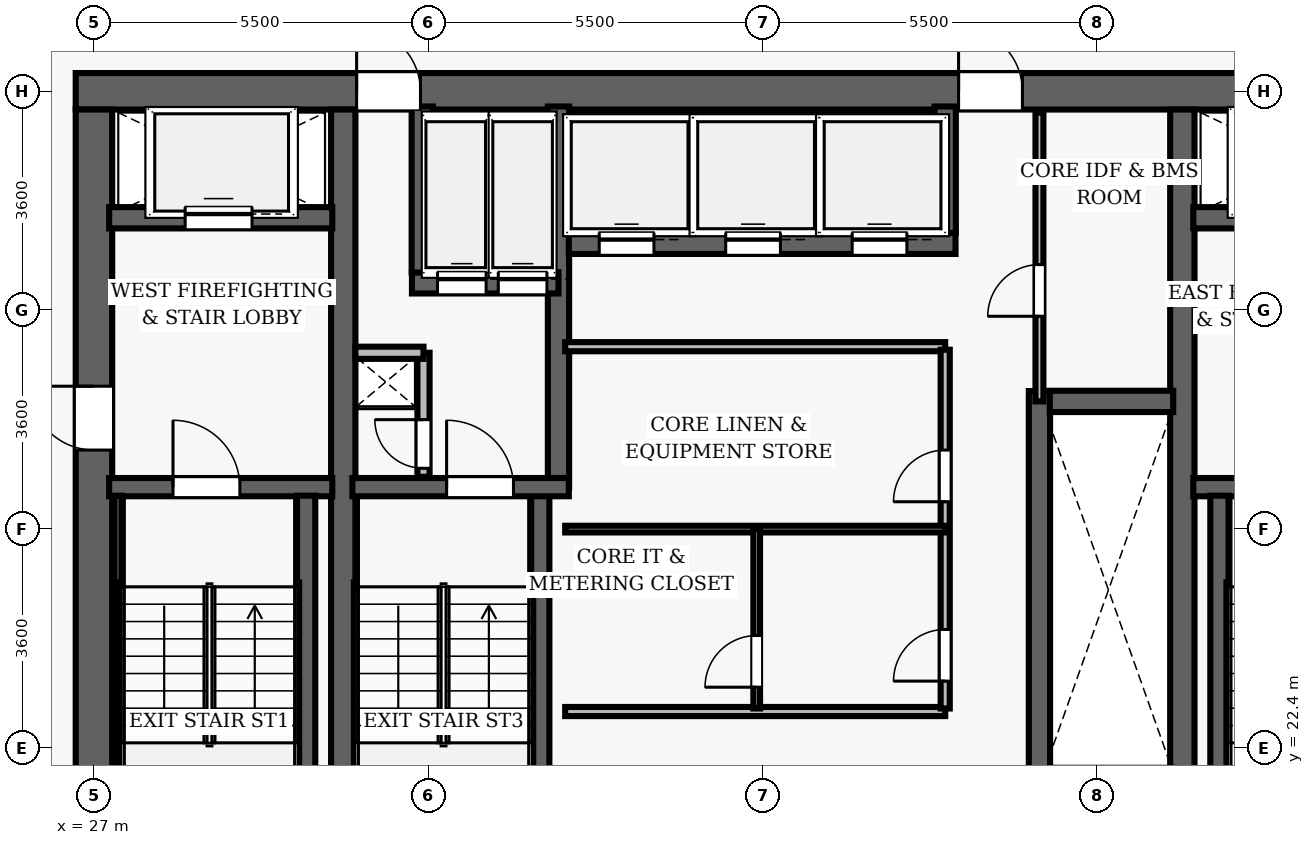
"""IFC4 building model, lengths in metres.
Left out: names, types, materials, properties, quantities, classifications, styles, units other than length and angle.
Written with IfcOpenShell. Run it as: python <this file> out.ifc"""

import sys

from ifc_helpers import new_model, si_unit, direction, frame, frame_2d, origin, place, context, subcontext, project, spatial, rectangle, extrude, element, fill, save


model = new_model("IFC4")
c1 = context("Model", 3, precision=1e-05, world=origin(), true_north=direction((0.0, 1.0)))
c2 = subcontext(c1, "Body", "Model", "MODEL_VIEW")
j1 = project(units=[si_unit("LENGTHUNIT", "METRE"), si_unit("PLANEANGLEUNIT", "RADIAN")], contexts=[c1])
p1 = place(None, origin())
s1 = spatial("IfcSite", under=j1, at=p1, CompositionType="ELEMENT")
p2 = place(p1, origin())
s2 = spatial("IfcBuilding", under=s1, at=p2, CompositionType="ELEMENT")
p3 = place(p2, frame((0.0, 0.0, 62.4)))
s3 = spatial("IfcBuildingStorey", under=s2, at=p3, CompositionType="ELEMENT", Elevation=62.4)
p4 = place(p3, frame((26.7, 33.2, 0.0), z_axis=(0.0, 0.0, 1.0), x_axis=(1.0, 0.0, 0.0)))
e1 = element("IfcWall", 1, at=p4, inside=s3, PredefinedType="SHEAR", context=c2, shape_type="SweptSolid", body=[
    extrude(rectangle(XDim=22.6, YDim=0.6, at=frame_2d((11.3, 0.0))), origin(), (0.0, 0.0, 1.0), 3.5),
])
p5 = place(p4, frame((4.62, 0.0, 0.0)))
e2 = element("IfcOpeningElement", 2, at=p5, cuts=e1, PredefinedType="OPENING", context=c2, shape_type="SweptSolid", body=[
    extrude(rectangle(XDim=1.05, YDim=2.15, at=frame_2d((0.525, 1.075))), frame((0.0, 0.31, 0.0), z_axis=(0.0, -1.0, 0.0), x_axis=(1.0, 0.0, 0.0)), (0.0, 0.0, 1.0), 0.62),
])
p6 = place(p4, frame((14.52, 0.0, 0.0)))
e3 = element("IfcOpeningElement", 3, at=p6, cuts=e1, PredefinedType="OPENING", context=c2, shape_type="SweptSolid", body=[
    extrude(rectangle(XDim=1.05, YDim=2.15, at=frame_2d((0.525, 1.075))), frame((0.0, 0.31, 0.0), z_axis=(0.0, -1.0, 0.0), x_axis=(1.0, 0.0, 0.0)), (0.0, 0.0, 1.0), 0.62),
])
p7 = place(p3, frame((27.0, 19.1, 0.0), z_axis=(0.0, 0.0, 1.0), x_axis=(0.0, 1.0, 0.0)))
e4 = element("IfcWall", 4, at=p7, inside=s3, PredefinedType="SHEAR", context=c2, shape_type="SweptSolid", body=[
    extrude(rectangle(XDim=13.8, YDim=0.6, at=frame_2d((6.9, 0.0))), origin(), (0.0, 0.0, 1.0), 3.5),
])
p8 = place(p7, frame((8.2, 0.0, 0.0)))
e5 = element("IfcOpeningElement", 5, at=p8, cuts=e4, PredefinedType="OPENING", context=c2, shape_type="SweptSolid", body=[
    extrude(rectangle(XDim=1.05, YDim=2.15, at=frame_2d((0.525, 1.075))), frame((0.0, 0.31, 0.0), z_axis=(0.0, -1.0, 0.0), x_axis=(1.0, 0.0, 0.0)), (0.0, 0.0, 1.0), 0.62),
])
for number, where, z_axis, x_axis in (
    (6, (31.1, 19.1, 0.0), (0.0, 0.0, 1.0), (0.0, 1.0, 0.0)),
    (7, (44.9, 19.1, 0.0), (0.0, 0.0, 1.0), (0.0, 1.0, 0.0)),
):
    element("IfcWall", number, at=place(p3, frame(where, z_axis=z_axis, x_axis=x_axis)), inside=s3, PredefinedType="SHEAR", context=c2, shape_type="SweptSolid", body=[
        extrude(rectangle(XDim=13.8, YDim=0.4, at=frame_2d((6.9, 0.0))), origin(), (0.0, 0.0, 1.0), 3.5),
    ])
p9 = place(p3, frame((27.25, 26.69, 0.0), z_axis=(0.0, 0.0, 1.0), x_axis=(1.0, 0.0, 0.0)))
e8 = element("IfcWall", 8, at=p9, inside=s3, PredefinedType="SHEAR", context=c2, shape_type="SweptSolid", body=[
    extrude(rectangle(XDim=3.67, YDim=0.3, at=frame_2d((1.835, 0.0))), origin(), (0.0, 0.0, 1.0), 3.5),
])
p10 = place(p9, frame((1.05, 0.0, 0.0)))
e9 = element("IfcOpeningElement", 9, at=p10, cuts=e8, PredefinedType="OPENING", context=c2, shape_type="SweptSolid", body=[
    extrude(rectangle(XDim=1.1, YDim=2.15, at=frame_2d((0.55, 1.075))), frame((0.0, 0.16, 0.0), z_axis=(0.0, -1.0, 0.0), x_axis=(1.0, 0.0, 0.0)), (0.0, 0.0, 1.0), 0.32),
])
p11 = place(p3, frame((30.49, 19.05, 0.0), z_axis=(0.0, 0.0, 1.0), x_axis=(0.0, 1.0, 0.0)))
e10 = element("IfcWall", 10, at=p11, inside=s3, PredefinedType="SHEAR", context=c2, shape_type="SweptSolid", body=[
    extrude(rectangle(XDim=7.5, YDim=0.3, at=frame_2d((3.75, 0.0))), origin(), (0.0, 0.0, 1.0), 3.5),
])
p12 = place(p3, frame((27.395, 19.1, 0.0), z_axis=(0.0, 0.0, 1.0), x_axis=(0.0, 1.0, 0.0)))
e11 = element("IfcWall", 11, at=p12, inside=s3, PredefinedType="SHEAR", context=c2, shape_type="SweptSolid", body=[
    extrude(rectangle(XDim=7.45, YDim=0.12, at=frame_2d((3.725, 0.0))), origin(), (0.0, 0.0, 1.0), 3.5),
])
p13 = place(p3, frame((27.25, 31.12, 0.0), z_axis=(0.0, 0.0, 1.0), x_axis=(1.0, 0.0, 0.0)))
e12 = element("IfcWall", 12, at=p13, inside=s3, PredefinedType="SHEAR", context=c2, shape_type="SweptSolid", body=[
    extrude(rectangle(XDim=3.67, YDim=0.35, at=frame_2d((1.835, 0.0))), origin(), (0.0, 0.0, 1.0), 2.6),
])
p14 = place(p13, frame((1.25, 0.0, 0.0)))
e13 = element("IfcOpeningElement", 13, at=p14, cuts=e12, PredefinedType="OPENING", context=c2, shape_type="SweptSolid", body=[
    extrude(rectangle(XDim=1.1, YDim=2.15, at=frame_2d((0.55, 1.075))), frame((0.0, 0.185, 0.0), z_axis=(0.0, -1.0, 0.0), x_axis=(1.0, 0.0, 0.0)), (0.0, 0.0, 1.0), 0.37),
])
p15 = place(p3, frame((45.08, 26.69, 0.0), z_axis=(0.0, 0.0, 1.0), x_axis=(1.0, 0.0, 0.0)))
e14 = element("IfcWall", 14, at=p15, inside=s3, PredefinedType="SHEAR", context=c2, shape_type="SweptSolid", body=[
    extrude(rectangle(XDim=3.67, YDim=0.3, at=frame_2d((1.835, 0.0))), origin(), (0.0, 0.0, 1.0), 3.5),
])
p16 = place(p15, frame((1.05, 0.0, 0.0)))
e15 = element("IfcOpeningElement", 15, at=p16, cuts=e14, PredefinedType="OPENING", context=c2, shape_type="SweptSolid", body=[
    extrude(rectangle(XDim=1.1, YDim=2.15, at=frame_2d((0.55, 1.075))), frame((0.0, 0.16, 0.0), z_axis=(0.0, -1.0, 0.0), x_axis=(1.0, 0.0, 0.0)), (0.0, 0.0, 1.0), 0.32),
])
p17 = place(p3, frame((45.51, 19.05, 0.0), z_axis=(0.0, 0.0, 1.0), x_axis=(0.0, 1.0, 0.0)))
e16 = element("IfcWall", 16, at=p17, inside=s3, PredefinedType="SHEAR", context=c2, shape_type="SweptSolid", body=[
    extrude(rectangle(XDim=7.5, YDim=0.3, at=frame_2d((3.75, 0.0))), origin(), (0.0, 0.0, 1.0), 3.5),
])
p18 = place(p3, frame((45.08, 31.12, 0.0), z_axis=(0.0, 0.0, 1.0), x_axis=(1.0, 0.0, 0.0)))
e17 = element("IfcWall", 17, at=p18, inside=s3, PredefinedType="SHEAR", context=c2, shape_type="SweptSolid", body=[
    extrude(rectangle(XDim=3.67, YDim=0.35, at=frame_2d((1.835, 0.0))), origin(), (0.0, 0.0, 1.0), 2.6),
])
p19 = place(p18, frame((1.25, 0.0, 0.0)))
e18 = element("IfcOpeningElement", 18, at=p19, cuts=e17, PredefinedType="OPENING", context=c2, shape_type="SweptSolid", body=[
    extrude(rectangle(XDim=1.1, YDim=2.15, at=frame_2d((0.55, 1.075))), frame((0.0, 0.185, 0.0), z_axis=(0.0, -1.0, 0.0), x_axis=(1.0, 0.0, 0.0)), (0.0, 0.0, 1.0), 0.37),
])
p20 = place(p3, frame((34.34, 19.05, 0.0), z_axis=(0.0, 0.0, 1.0), x_axis=(0.0, 1.0, 0.0)))
e19 = element("IfcWall", 19, at=p20, inside=s3, PredefinedType="SHEAR", context=c2, shape_type="SweptSolid", body=[
    extrude(rectangle(XDim=7.5, YDim=0.3, at=frame_2d((3.75, 0.0))), origin(), (0.0, 0.0, 1.0), 3.5),
])
p21 = place(p3, frame((34.64, 26.69, 0.0), z_axis=(0.0, 0.0, 1.0), x_axis=(0.0, 1.0, 0.0)))
e20 = element("IfcWall", 20, at=p21, inside=s3, PredefinedType="SHEAR", context=c2, shape_type="SweptSolid", body=[
    extrude(rectangle(XDim=6.26, YDim=0.35, at=frame_2d((3.13, 0.0))), origin(), (0.0, 0.0, 1.0), 3.5),
])
p22 = place(p3, frame((31.25, 26.69, 0.0), z_axis=(0.0, 0.0, 1.0), x_axis=(1.0, 0.0, 0.0)))
e21 = element("IfcWall", 21, at=p22, inside=s3, PredefinedType="SHEAR", context=c2, shape_type="SweptSolid", body=[
    extrude(rectangle(XDim=3.56, YDim=0.3, at=frame_2d((1.78, 0.0))), origin(), (0.0, 0.0, 1.0), 3.5),
])
p23 = place(p22, frame((1.55, 0.0, 0.0)))
e22 = element("IfcOpeningElement", 22, at=p23, cuts=e21, PredefinedType="OPENING", context=c2, shape_type="SweptSolid", body=[
    extrude(rectangle(XDim=1.1, YDim=2.15, at=frame_2d((0.55, 1.075))), frame((0.0, 0.16, 0.0), z_axis=(0.0, -1.0, 0.0), x_axis=(1.0, 0.0, 0.0)), (0.0, 0.0, 1.0), 0.32),
])
p24 = place(p3, frame((32.23, 30.05, 0.0), z_axis=(0.0, 0.0, 1.0), x_axis=(1.0, 0.0, 0.0)))
e23 = element("IfcWall", 23, at=p24, inside=s3, PredefinedType="SHEAR", context=c2, shape_type="SweptSolid", body=[
    extrude(rectangle(XDim=2.41, YDim=0.35, at=frame_2d((1.205, 0.0))), origin(), (0.0, 0.0, 1.0), 2.6),
])
p25 = place(p24, frame((0.42, 0.0, 0.0)))
e24 = element("IfcOpeningElement", 24, at=p25, cuts=e23, PredefinedType="OPENING", context=c2, shape_type="SweptSolid", body=[
    extrude(rectangle(XDim=0.8, YDim=2.15, at=frame_2d((0.4, 1.075))), frame((0.0, 0.185, 0.0), z_axis=(0.0, -1.0, 0.0), x_axis=(1.0, 0.0, 0.0)), (0.0, 0.0, 1.0), 0.37),
])
p26 = place(p24, frame((1.42, 0.0, 0.0)))
e25 = element("IfcOpeningElement", 25, at=p26, cuts=e23, PredefinedType="OPENING", context=c2, shape_type="SweptSolid", body=[
    extrude(rectangle(XDim=0.8, YDim=2.15, at=frame_2d((0.4, 1.075))), frame((0.0, 0.185, 0.0), z_axis=(0.0, -1.0, 0.0), x_axis=(1.0, 0.0, 0.0)), (0.0, 0.0, 1.0), 0.37),
])
p27 = place(p3, frame((32.4, 30.22, 0.0), z_axis=(0.0, 0.0, 1.0), x_axis=(0.0, 1.0, 0.0)))
e26 = element("IfcWall", 26, at=p27, inside=s3, PredefinedType="SHEAR", context=c2, shape_type="SweptSolid", body=[
    extrude(rectangle(XDim=2.73, YDim=0.35, at=frame_2d((1.365, 0.0))), origin(), (0.0, 0.0, 1.0), 2.6),
])
p28 = place(p3, frame((32.42, 26.86, 0.0), z_axis=(0.0, 0.0, 1.0), x_axis=(0.0, 1.0, 0.0)))
e27 = element("IfcWall", 27, at=p28, inside=s3, PredefinedType="PARTITIONING", context=c2, shape_type="SweptSolid", body=[
    extrude(rectangle(XDim=2.04, YDim=0.2, at=frame_2d((1.02, 0.0))), origin(), (0.0, 0.0, 1.0), 2.6),
])
p29 = place(p28, frame((0.14, 0.0, 0.0)))
e28 = element("IfcOpeningElement", 28, at=p29, cuts=e27, PredefinedType="OPENING", context=c2, shape_type="SweptSolid", body=[
    extrude(rectangle(XDim=0.8, YDim=2.05, at=frame_2d((0.4, 1.025))), frame((0.0, 0.11, 0.0), z_axis=(0.0, -1.0, 0.0), x_axis=(1.0, 0.0, 0.0)), (0.0, 0.0, 1.0), 0.22),
])
p30 = place(p3, frame((31.3, 28.9, 0.0), z_axis=(0.0, 0.0, 1.0), x_axis=(1.0, 0.0, 0.0)))
e29 = element("IfcWall", 29, at=p30, inside=s3, PredefinedType="PARTITIONING", context=c2, shape_type="SweptSolid", body=[
    extrude(rectangle(XDim=1.12, YDim=0.2, at=frame_2d((0.56, 0.0))), origin(), (0.0, 0.0, 1.0), 2.6),
])
p31 = place(p3, frame((42.55, 21.73, 0.0), z_axis=(0.0, 0.0, 1.0), x_axis=(0.0, 1.0, 0.0)))
e30 = element("IfcWall", 30, at=p31, inside=s3, PredefinedType="SHEAR", context=c2, shape_type="SweptSolid", body=[
    extrude(rectangle(XDim=6.54, YDim=0.35, at=frame_2d((3.27, 0.0))), origin(), (0.0, 0.0, 1.0), 2.6),
])
p32 = place(p3, frame((42.72, 28.1, 0.0), z_axis=(0.0, 0.0, 1.0), x_axis=(1.0, 0.0, 0.0)))
e31 = element("IfcWall", 31, at=p32, inside=s3, PredefinedType="SHEAR", context=c2, shape_type="SweptSolid", body=[
    extrude(rectangle(XDim=2.03, YDim=0.35, at=frame_2d((1.015, 0.0))), origin(), (0.0, 0.0, 1.0), 2.6),
])
p33 = place(p3, frame((34.81, 30.7, 0.0), z_axis=(0.0, 0.0, 1.0), x_axis=(1.0, 0.0, 0.0)))
e32 = element("IfcWall", 32, at=p33, inside=s3, PredefinedType="SHEAR", context=c2, shape_type="SweptSolid", body=[
    extrude(rectangle(XDim=6.36, YDim=0.35, at=frame_2d((3.18, 0.0))), origin(), (0.0, 0.0, 1.0), 2.6),
])
p34 = place(p33, frame((0.5, 0.0, 0.0)))
e33 = element("IfcOpeningElement", 33, at=p34, cuts=e32, PredefinedType="OPENING", context=c2, shape_type="SweptSolid", body=[
    extrude(rectangle(XDim=0.9, YDim=2.15, at=frame_2d((0.45, 1.075))), frame((0.0, 0.185, 0.0), z_axis=(0.0, -1.0, 0.0), x_axis=(1.0, 0.0, 0.0)), (0.0, 0.0, 1.0), 0.37),
])
p35 = place(p33, frame((2.58, 0.0, 0.0)))
e34 = element("IfcOpeningElement", 34, at=p35, cuts=e32, PredefinedType="OPENING", context=c2, shape_type="SweptSolid", body=[
    extrude(rectangle(XDim=0.9, YDim=2.15, at=frame_2d((0.45, 1.075))), frame((0.0, 0.185, 0.0), z_axis=(0.0, -1.0, 0.0), x_axis=(1.0, 0.0, 0.0)), (0.0, 0.0, 1.0), 0.37),
])
p36 = place(p33, frame((4.66, 0.0, 0.0)))
e35 = element("IfcOpeningElement", 35, at=p36, cuts=e32, PredefinedType="OPENING", context=c2, shape_type="SweptSolid", body=[
    extrude(rectangle(XDim=0.9, YDim=2.15, at=frame_2d((0.45, 1.075))), frame((0.0, 0.185, 0.0), z_axis=(0.0, -1.0, 0.0), x_axis=(1.0, 0.0, 0.0)), (0.0, 0.0, 1.0), 0.37),
])
p37 = place(p3, frame((41.0, 30.87, 0.0), z_axis=(0.0, 0.0, 1.0), x_axis=(0.0, 1.0, 0.0)))
e36 = element("IfcWall", 36, at=p37, inside=s3, PredefinedType="SHEAR", context=c2, shape_type="SweptSolid", body=[
    extrude(rectangle(XDim=2.08, YDim=0.35, at=frame_2d((1.04, 0.0))), origin(), (0.0, 0.0, 1.0), 2.6),
])
for number, where, z_axis, x_axis in (
    (37, (34.75, 29.0, 0.0), (0.0, 0.0, 1.0), (1.0, 0.0, 0.0)),
    (38, (34.75, 23.0, 0.0), (0.0, 0.0, 1.0), (1.0, 0.0, 0.0)),
):
    element("IfcWall", number, at=place(p3, frame(where, z_axis=z_axis, x_axis=x_axis)), inside=s3, PredefinedType="PARTITIONING", context=c2, shape_type="SweptSolid", body=[
        extrude(rectangle(XDim=6.25, YDim=0.15, at=frame_2d((3.125, 0.0))), origin(), (0.0, 0.0, 1.0), 2.6),
    ])
p38 = place(p3, frame((41.0, 23.05, 0.0), z_axis=(0.0, 0.0, 1.0), x_axis=(0.0, 1.0, 0.0)))
e39 = element("IfcWall", 39, at=p38, inside=s3, PredefinedType="PARTITIONING", context=c2, shape_type="SweptSolid", body=[
    extrude(rectangle(XDim=5.9, YDim=0.15, at=frame_2d((2.95, 0.0))), origin(), (0.0, 0.0, 1.0), 2.6),
])
p39 = place(p38, frame((3.4, 0.0, 0.0)))
e40 = element("IfcOpeningElement", 40, at=p39, cuts=e39, PredefinedType="OPENING", context=c2, shape_type="SweptSolid", body=[
    extrude(rectangle(XDim=0.85, YDim=2.1, at=frame_2d((0.425, 1.05))), frame((0.0, 0.085, 0.0), z_axis=(0.0, -1.0, 0.0), x_axis=(1.0, 0.0, 0.0)), (0.0, 0.0, 1.0), 0.17),
])
p40 = place(p38, frame((0.45, 0.0, 0.0)))
e41 = element("IfcOpeningElement", 41, at=p40, cuts=e39, PredefinedType="OPENING", context=c2, shape_type="SweptSolid", body=[
    extrude(rectangle(XDim=0.85, YDim=2.1, at=frame_2d((0.425, 1.05))), frame((0.0, 0.085, 0.0), z_axis=(0.0, -1.0, 0.0), x_axis=(1.0, 0.0, 0.0)), (0.0, 0.0, 1.0), 0.17),
])
p41 = place(p3, frame((34.75, 26.0, 0.0), z_axis=(0.0, 0.0, 1.0), x_axis=(1.0, 0.0, 0.0)))
e42 = element("IfcWall", 42, at=p41, inside=s3, PredefinedType="PARTITIONING", context=c2, shape_type="SweptSolid", body=[
    extrude(rectangle(XDim=6.25, YDim=0.11, at=frame_2d((3.125, 0.0))), origin(), (0.0, 0.0, 1.0), 2.6),
])
p42 = place(p3, frame((37.9, 23.05, 0.0), z_axis=(0.0, 0.0, 1.0), x_axis=(0.0, 1.0, 0.0)))
e43 = element("IfcWall", 43, at=p42, inside=s3, PredefinedType="PARTITIONING", context=c2, shape_type="SweptSolid", body=[
    extrude(rectangle(XDim=2.95, YDim=0.11, at=frame_2d((1.475, 0.0))), origin(), (0.0, 0.0, 1.0), 2.6),
])
p43 = place(p42, frame((0.35, 0.0, 0.0)))
e44 = element("IfcOpeningElement", 44, at=p43, cuts=e43, PredefinedType="OPENING", context=c2, shape_type="SweptSolid", body=[
    extrude(rectangle(XDim=0.85, YDim=2.1, at=frame_2d((0.425, 1.05))), frame((0.0, 0.065, 0.0), z_axis=(0.0, -1.0, 0.0), x_axis=(1.0, 0.0, 0.0)), (0.0, 0.0, 1.0), 0.13),
])
p44 = place(p3, frame((42.55, 28.1, 0.0), z_axis=(0.0, 0.0, 1.0), x_axis=(0.0, 1.0, 0.0)))
e45 = element("IfcWall", 45, at=p44, inside=s3, PredefinedType="PARTITIONING", context=c2, shape_type="SweptSolid", body=[
    extrude(rectangle(XDim=4.75, YDim=0.13, at=frame_2d((2.375, 0.0))), origin(), (0.0, 0.0, 1.0), 2.6),
])
p45 = place(p44, frame((1.4, 0.0, 0.0)))
e46 = element("IfcOpeningElement", 46, at=p45, cuts=e45, PredefinedType="OPENING", context=c2, shape_type="SweptSolid", body=[
    extrude(rectangle(XDim=0.85, YDim=2.1, at=frame_2d((0.425, 1.05))), frame((0.0, 0.075, 0.0), z_axis=(0.0, -1.0, 0.0), x_axis=(1.0, 0.0, 0.0)), (0.0, 0.0, 1.0), 0.15),
])
p46 = place(p10, origin())
e47 = element("IfcDoor", 47, at=p46, inside=s3, OperationType="SINGLE_SWING_LEFT", PredefinedType="DOOR", context=c2, shape_type="SweptSolid", body=[
    extrude(rectangle(XDim=1.1, YDim=2.15, at=frame_2d((0.55, 1.075))), frame((0.0, 0.025, 0.0), z_axis=(0.0, -1.0, 0.0), x_axis=(1.0, 0.0, 0.0)), (0.0, 0.0, 1.0), 0.05),
])
fill(e9, e47)
p47 = place(p8, origin())
e48 = element("IfcDoor", 48, at=p47, inside=s3, OperationType="SINGLE_SWING_RIGHT", PredefinedType="DOOR", context=c2, shape_type="SweptSolid", body=[
    extrude(rectangle(XDim=1.05, YDim=2.15, at=frame_2d((0.525, 1.075))), frame((0.0, 0.025, 0.0), z_axis=(0.0, -1.0, 0.0), x_axis=(1.0, 0.0, 0.0)), (0.0, 0.0, 1.0), 0.05),
])
fill(e5, e48)
p48 = place(p23, origin())
e49 = element("IfcDoor", 49, at=p48, inside=s3, OperationType="SINGLE_SWING_LEFT", PredefinedType="DOOR", context=c2, shape_type="SweptSolid", body=[
    extrude(rectangle(XDim=1.1, YDim=2.15, at=frame_2d((0.55, 1.075))), frame((0.0, 0.025, 0.0), z_axis=(0.0, -1.0, 0.0), x_axis=(1.0, 0.0, 0.0)), (0.0, 0.0, 1.0), 0.05),
])
fill(e22, e49)
p49 = place(p29, origin())
e50 = element("IfcDoor", 50, at=p49, inside=s3, OperationType="SINGLE_SWING_RIGHT", PredefinedType="DOOR", context=c2, shape_type="SweptSolid", body=[
    extrude(rectangle(XDim=0.8, YDim=2.05, at=frame_2d((0.4, 1.025))), frame((0.0, 0.025, 0.0), z_axis=(0.0, -1.0, 0.0), x_axis=(1.0, 0.0, 0.0)), (0.0, 0.0, 1.0), 0.05),
])
fill(e28, e50)
p50 = place(p5, origin())
e51 = element("IfcDoor", 51, at=p50, inside=s3, OperationType="SINGLE_SWING_LEFT", PredefinedType="DOOR", context=c2, shape_type="SweptSolid", body=[
    extrude(rectangle(XDim=1.05, YDim=2.15, at=frame_2d((0.525, 1.075))), frame((0.0, 0.025, 0.0), z_axis=(0.0, -1.0, 0.0), x_axis=(1.0, 0.0, 0.0)), (0.0, 0.0, 1.0), 0.05),
])
fill(e2, e51)
p51 = place(p6, origin())
e52 = element("IfcDoor", 52, at=p51, inside=s3, OperationType="SINGLE_SWING_LEFT", PredefinedType="DOOR", context=c2, shape_type="SweptSolid", body=[
    extrude(rectangle(XDim=1.05, YDim=2.15, at=frame_2d((0.525, 1.075))), frame((0.0, 0.025, 0.0), z_axis=(0.0, -1.0, 0.0), x_axis=(1.0, 0.0, 0.0)), (0.0, 0.0, 1.0), 0.05),
])
fill(e3, e52)
p52 = place(p39, origin())
e53 = element("IfcDoor", 53, at=p52, inside=s3, OperationType="SINGLE_SWING_LEFT", PredefinedType="DOOR", context=c2, shape_type="SweptSolid", body=[
    extrude(rectangle(XDim=0.85, YDim=2.1, at=frame_2d((0.425, 1.05))), frame((0.0, 0.025, 0.0), z_axis=(0.0, -1.0, 0.0), x_axis=(1.0, 0.0, 0.0)), (0.0, 0.0, 1.0), 0.05),
])
fill(e40, e53)
p53 = place(p40, origin())
e54 = element("IfcDoor", 54, at=p53, inside=s3, OperationType="SINGLE_SWING_LEFT", PredefinedType="DOOR", context=c2, shape_type="SweptSolid", body=[
    extrude(rectangle(XDim=0.85, YDim=2.1, at=frame_2d((0.425, 1.05))), frame((0.0, 0.025, 0.0), z_axis=(0.0, -1.0, 0.0), x_axis=(1.0, 0.0, 0.0)), (0.0, 0.0, 1.0), 0.05),
])
fill(e41, e54)
p54 = place(p43, origin())
e55 = element("IfcDoor", 55, at=p54, inside=s3, OperationType="SINGLE_SWING_LEFT", PredefinedType="DOOR", context=c2, shape_type="SweptSolid", body=[
    extrude(rectangle(XDim=0.85, YDim=2.1, at=frame_2d((0.425, 1.05))), frame((0.0, 0.025, 0.0), z_axis=(0.0, -1.0, 0.0), x_axis=(1.0, 0.0, 0.0)), (0.0, 0.0, 1.0), 0.05),
])
fill(e44, e55)
p55 = place(p45, origin())
e56 = element("IfcDoor", 56, at=p55, inside=s3, OperationType="SINGLE_SWING_LEFT", PredefinedType="DOOR", context=c2, shape_type="SweptSolid", body=[
    extrude(rectangle(XDim=0.85, YDim=2.1, at=frame_2d((0.425, 1.05))), frame((0.0, 0.025, 0.0), z_axis=(0.0, -1.0, 0.0), x_axis=(1.0, 0.0, 0.0)), (0.0, 0.0, 1.0), 0.05),
])
fill(e46, e56)
p56 = place(p34, origin())
e57 = element("IfcDoor", 57, at=p56, inside=s3, OperationType="SLIDING_TO_LEFT", PredefinedType="DOOR", context=c2, shape_type="SweptSolid", body=[
    extrude(rectangle(XDim=0.9, YDim=2.15, at=frame_2d((0.45, 1.075))), frame((0.0, 0.025, 0.0), z_axis=(0.0, -1.0, 0.0), x_axis=(1.0, 0.0, 0.0)), (0.0, 0.0, 1.0), 0.05),
])
fill(e33, e57)
p57 = place(p35, origin())
e58 = element("IfcDoor", 58, at=p57, inside=s3, OperationType="SLIDING_TO_LEFT", PredefinedType="DOOR", context=c2, shape_type="SweptSolid", body=[
    extrude(rectangle(XDim=0.9, YDim=2.15, at=frame_2d((0.45, 1.075))), frame((0.0, 0.025, 0.0), z_axis=(0.0, -1.0, 0.0), x_axis=(1.0, 0.0, 0.0)), (0.0, 0.0, 1.0), 0.05),
])
fill(e34, e58)
p58 = place(p36, origin())
e59 = element("IfcDoor", 59, at=p58, inside=s3, OperationType="SLIDING_TO_LEFT", PredefinedType="DOOR", context=c2, shape_type="SweptSolid", body=[
    extrude(rectangle(XDim=0.9, YDim=2.15, at=frame_2d((0.45, 1.075))), frame((0.0, 0.025, 0.0), z_axis=(0.0, -1.0, 0.0), x_axis=(1.0, 0.0, 0.0)), (0.0, 0.0, 1.0), 0.05),
])
fill(e35, e59)
p59 = place(p14, origin())
e60 = element("IfcDoor", 60, at=p59, inside=s3, OperationType="SLIDING_TO_LEFT", PredefinedType="DOOR", context=c2, shape_type="SweptSolid", body=[
    extrude(rectangle(XDim=1.1, YDim=2.15, at=frame_2d((0.55, 1.075))), frame((0.0, 0.025, 0.0), z_axis=(0.0, -1.0, 0.0), x_axis=(1.0, 0.0, 0.0)), (0.0, 0.0, 1.0), 0.05),
])
fill(e13, e60)
p60 = place(p25, origin())
e61 = element("IfcDoor", 61, at=p60, inside=s3, OperationType="SLIDING_TO_LEFT", PredefinedType="DOOR", context=c2, shape_type="SweptSolid", body=[
    extrude(rectangle(XDim=0.8, YDim=2.15, at=frame_2d((0.4, 1.075))), frame((0.0, 0.025, 0.0), z_axis=(0.0, -1.0, 0.0), x_axis=(1.0, 0.0, 0.0)), (0.0, 0.0, 1.0), 0.05),
])
fill(e24, e61)
p61 = place(p26, origin())
e62 = element("IfcDoor", 62, at=p61, inside=s3, OperationType="SLIDING_TO_LEFT", PredefinedType="DOOR", context=c2, shape_type="SweptSolid", body=[
    extrude(rectangle(XDim=0.8, YDim=2.15, at=frame_2d((0.4, 1.075))), frame((0.0, 0.025, 0.0), z_axis=(0.0, -1.0, 0.0), x_axis=(1.0, 0.0, 0.0)), (0.0, 0.0, 1.0), 0.05),
])
fill(e25, e62)
save(model, sys.argv[1])
